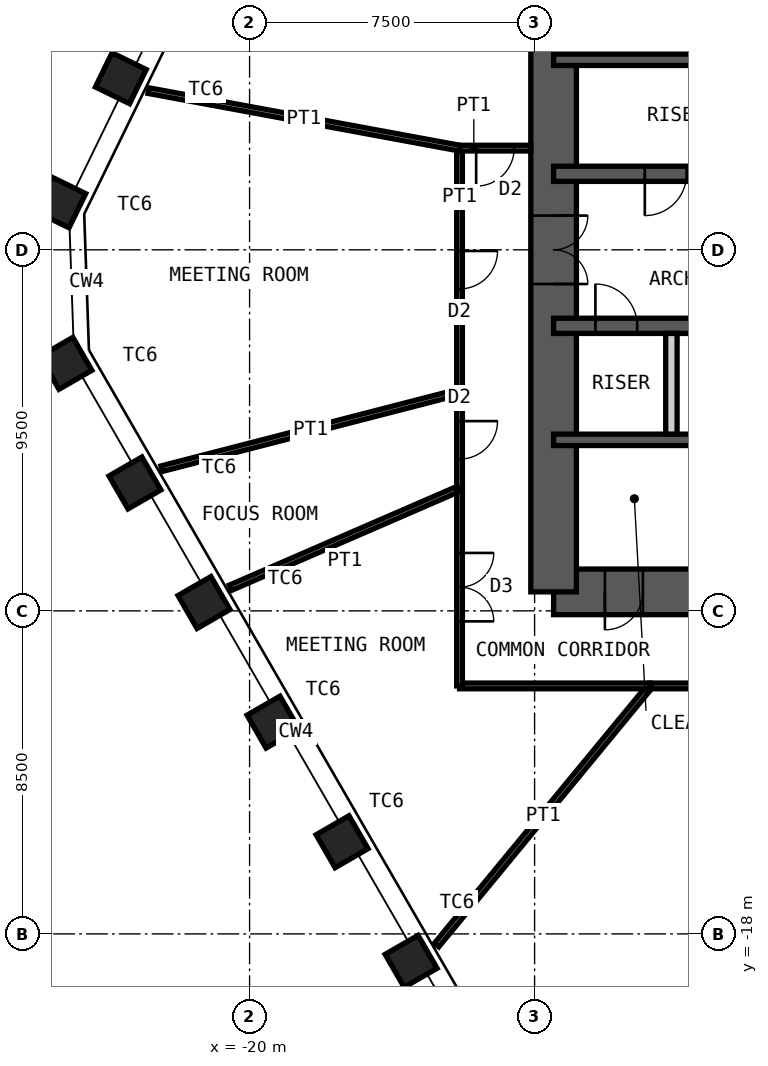
"""IFC4 building model, lengths in metres.
Left out: names, types, materials, properties, quantities, classifications, styles, units other than length and angle.
Written with IfcOpenShell. Run it as: python <this file> out.ifc"""

import sys

from ifc_helpers import new_model, si_unit, direction, frame, frame_2d, origin, origin_2d, place, context, subcontext, project, spatial, rectangle, hollow_rectangle, extrude, element, fill, save


model = new_model("IFC4")
c1 = context("Model", 3, precision=1e-05, world=origin(), true_north=direction((0.0, 1.0)))
c2 = subcontext(c1, "Body", "Model", "MODEL_VIEW")
j1 = project(units=[si_unit("LENGTHUNIT", "METRE"), si_unit("PLANEANGLEUNIT", "RADIAN")], contexts=[c1])
p1 = place(None, origin())
s1 = spatial("IfcSite", under=j1, at=p1, CompositionType="ELEMENT")
p2 = place(p1, origin())
s2 = spatial("IfcBuilding", under=s1, at=p2, CompositionType="ELEMENT")
p3 = place(p2, frame((0.0, 0.0, 247.6)))
s3 = spatial("IfcBuildingStorey", under=s2, at=p3, CompositionType="ELEMENT", Elevation=247.6)
for number, where, z_axis, x_axis in (
    (1, (-15.749, -18.721, 0.0), (0.0, 0.0, 1.0), (0.5, -0.866, 0.0)),
    (2, (-17.566, -15.574, 0.0), (0.0, 0.0, 1.0), (0.5, -0.866, 0.0)),
    (3, (-19.383, -12.428, 0.0), (0.0, 0.0, 1.0), (0.5, -0.866, 0.0)),
    (4, (-21.2, -9.281, 0.0), (0.0, 0.0, 1.0), (0.5, -0.866, 0.0)),
    (5, (-23.016, -6.134, 0.0), (0.0, 0.0, 1.0), (0.5, -0.866, 0.0)),
    (6, (-24.833, -2.988, 0.0), (0.0, 0.0, 1.0), (0.5, -0.866, 0.0)),
    (7, (-24.981, 1.248, 0.0), (0.0, 0.0, 1.0), (-0.438, -0.899, 0.0)),
    (8, (-23.388, 4.514, 0.0), (0.0, 0.0, 1.0), (-0.438, -0.899, 0.0)),
):
    element("IfcColumn", number, at=place(p3, frame(where, z_axis=z_axis, x_axis=x_axis)), inside=s3, PredefinedType="COLUMN", context=c2, shape_type="SweptSolid", body=[
        extrude(hollow_rectangle(XDim=1.0, YDim=1.0, WallThickness=0.06, at=origin_2d()), origin(), (0.0, 0.0, 1.0), 4.2),
    ])
p4 = place(p3, frame((-12.0, -9.0, 0.0), z_axis=(0.0, 0.0, 1.0), x_axis=(1.0, 0.0, 0.0)))
e9 = element("IfcWall", 9, at=p4, inside=s3, PredefinedType="SHEAR", context=c2, shape_type="SweptSolid", body=[
    extrude(rectangle(XDim=24.0, YDim=1.2, at=frame_2d((12.0, 0.0))), origin(), (0.0, 0.0, 1.0), 4.2),
])
p5 = place(p4, frame((1.35, 0.0, 0.0)))
e10 = element("IfcOpeningElement", 10, at=p5, cuts=e9, PredefinedType="OPENING", context=c2, shape_type="SweptSolid", body=[
    extrude(rectangle(XDim=1.0, YDim=2.1, at=frame_2d((0.5, 1.05))), frame((0.0, 0.61, 0.0), z_axis=(0.0, -1.0, 0.0), x_axis=(1.0, 0.0, 0.0)), (0.0, 0.0, 1.0), 1.22),
])
p6 = place(p4, frame((5.325, 0.0, 0.0)))
e11 = element("IfcOpeningElement", 11, at=p6, cuts=e9, PredefinedType="OPENING", context=c2, shape_type="SweptSolid", body=[
    extrude(rectangle(XDim=1.15, YDim=2.1, at=frame_2d((0.575, 1.05))), frame((0.0, 0.61, 0.0), z_axis=(0.0, -1.0, 0.0), x_axis=(1.0, 0.0, 0.0)), (0.0, 0.0, 1.0), 1.22),
])
p7 = place(p4, frame((12.6, 0.0, 0.0)))
e12 = element("IfcOpeningElement", 12, at=p7, cuts=e9, PredefinedType="OPENING", context=c2, shape_type="SweptSolid", body=[
    extrude(rectangle(XDim=1.0, YDim=2.1, at=frame_2d((0.5, 1.05))), frame((0.0, 0.61, 0.0), z_axis=(0.0, -1.0, 0.0), x_axis=(1.0, 0.0, 0.0)), (0.0, 0.0, 1.0), 1.22),
])
p8 = place(p3, frame((-12.0, -9.0, 0.0), z_axis=(0.0, 0.0, 1.0), x_axis=(0.0, 1.0, 0.0)))
e13 = element("IfcWall", 13, at=p8, inside=s3, PredefinedType="SHEAR", context=c2, shape_type="SweptSolid", body=[
    extrude(rectangle(XDim=18.0, YDim=1.2, at=frame_2d((9.0, 0.0))), origin(), (0.0, 0.0, 1.0), 4.2),
])
p9 = place(p8, frame((8.1, 0.0, 0.0)))
e14 = element("IfcOpeningElement", 14, at=p9, cuts=e13, PredefinedType="OPENING", context=c2, shape_type="SweptSolid", body=[
    extrude(rectangle(XDim=1.8, YDim=2.1, at=frame_2d((0.9, 1.05))), frame((0.0, 0.61, 0.0), z_axis=(0.0, -1.0, 0.0), x_axis=(1.0, 0.0, 0.0)), (0.0, 0.0, 1.0), 1.22),
])
p10 = place(p3, frame((-12.0, 5.0, 0.0), z_axis=(0.0, 0.0, 1.0), x_axis=(1.0, 0.0, 0.0)))
e15 = element("IfcWall", 15, at=p10, inside=s3, PredefinedType="SHEAR", context=c2, shape_type="SweptSolid", body=[
    extrude(rectangle(XDim=24.0, YDim=0.3, at=frame_2d((12.0, 0.0))), origin(), (0.0, 0.0, 1.0), 4.2),
])
p11 = place(p3, frame((-12.0, 2.0, 0.0), z_axis=(0.0, 0.0, 1.0), x_axis=(1.0, 0.0, 0.0)))
e16 = element("IfcWall", 16, at=p11, inside=s3, PredefinedType="SHEAR", context=c2, shape_type="SweptSolid", body=[
    extrude(rectangle(XDim=24.0, YDim=0.4, at=frame_2d((12.0, 0.0))), origin(), (0.0, 0.0, 1.0), 4.2),
])
p12 = place(p11, frame((2.4, 0.0, 0.0)))
e17 = element("IfcOpeningElement", 17, at=p12, cuts=e16, PredefinedType="OPENING", context=c2, shape_type="SweptSolid", body=[
    extrude(rectangle(XDim=1.1, YDim=2.1, at=frame_2d((0.55, 1.05))), frame((0.0, 0.21, 0.0), z_axis=(0.0, -1.0, 0.0), x_axis=(1.0, 0.0, 0.0)), (0.0, 0.0, 1.0), 0.42),
])
p13 = place(p11, frame((22.0, 0.0, 0.0)))
e18 = element("IfcOpeningElement", 18, at=p13, cuts=e16, PredefinedType="OPENING", context=c2, shape_type="SweptSolid", body=[
    extrude(rectangle(XDim=1.1, YDim=2.1, at=frame_2d((0.55, 1.05))), frame((0.0, 0.21, 0.0), z_axis=(0.0, -1.0, 0.0), x_axis=(1.0, 0.0, 0.0)), (0.0, 0.0, 1.0), 0.42),
])
p14 = place(p11, frame((10.15, 0.0, 0.0)))
e19 = element("IfcOpeningElement", 19, at=p14, cuts=e16, PredefinedType="OPENING", context=c2, shape_type="SweptSolid", body=[
    extrude(rectangle(XDim=1.0, YDim=2.1, at=frame_2d((0.5, 1.05))), frame((0.0, 0.21, 0.0), z_axis=(0.0, -1.0, 0.0), x_axis=(1.0, 0.0, 0.0)), (0.0, 0.0, 1.0), 0.42),
])
p15 = place(p11, frame((6.9, 0.0, 0.0)))
e20 = element("IfcOpeningElement", 20, at=p15, cuts=e16, PredefinedType="OPENING", context=c2, shape_type="SweptSolid", body=[
    extrude(rectangle(XDim=1.0, YDim=2.1, at=frame_2d((0.5, 1.05))), frame((0.0, 0.21, 0.0), z_axis=(0.0, -1.0, 0.0), x_axis=(1.0, 0.0, 0.0)), (0.0, 0.0, 1.0), 0.42),
])
p16 = place(p11, frame((13.35, 0.0, 0.0)))
e21 = element("IfcOpeningElement", 21, at=p16, cuts=e16, PredefinedType="OPENING", context=c2, shape_type="SweptSolid", body=[
    extrude(rectangle(XDim=1.1, YDim=2.4, at=frame_2d((0.55, 1.2))), frame((0.0, 0.21, 0.0), z_axis=(0.0, -1.0, 0.0), x_axis=(1.0, 0.0, 0.0)), (0.0, 0.0, 1.0), 0.42),
])
p17 = place(p11, frame((16.15, 0.0, 0.0)))
e22 = element("IfcOpeningElement", 22, at=p17, cuts=e16, PredefinedType="OPENING", context=c2, shape_type="SweptSolid", body=[
    extrude(rectangle(XDim=1.1, YDim=2.4, at=frame_2d((0.55, 1.2))), frame((0.0, 0.21, 0.0), z_axis=(0.0, -1.0, 0.0), x_axis=(1.0, 0.0, 0.0)), (0.0, 0.0, 1.0), 0.42),
])
p18 = place(p11, frame((18.95, 0.0, 0.0)))
e23 = element("IfcOpeningElement", 23, at=p18, cuts=e16, PredefinedType="OPENING", context=c2, shape_type="SweptSolid", body=[
    extrude(rectangle(XDim=1.1, YDim=2.4, at=frame_2d((0.55, 1.2))), frame((0.0, 0.21, 0.0), z_axis=(0.0, -1.0, 0.0), x_axis=(1.0, 0.0, 0.0)), (0.0, 0.0, 1.0), 0.42),
])
p19 = place(p3, frame((-12.0, -2.0, 0.0), z_axis=(0.0, 0.0, 1.0), x_axis=(1.0, 0.0, 0.0)))
e24 = element("IfcWall", 24, at=p19, inside=s3, PredefinedType="SHEAR", context=c2, shape_type="SweptSolid", body=[
    extrude(rectangle(XDim=24.0, YDim=0.4, at=frame_2d((12.0, 0.0))), origin(), (0.0, 0.0, 1.0), 4.2),
])
p20 = place(p19, frame((1.1, 0.0, 0.0)))
e25 = element("IfcOpeningElement", 25, at=p20, cuts=e24, PredefinedType="OPENING", context=c2, shape_type="SweptSolid", body=[
    extrude(rectangle(XDim=1.1, YDim=2.1, at=frame_2d((0.55, 1.05))), frame((0.0, 0.21, 0.0), z_axis=(0.0, -1.0, 0.0), x_axis=(1.0, 0.0, 0.0)), (0.0, 0.0, 1.0), 0.42),
])
p21 = place(p19, frame((13.55, 0.0, 0.0)))
e26 = element("IfcOpeningElement", 26, at=p21, cuts=e24, PredefinedType="OPENING", context=c2, shape_type="SweptSolid", body=[
    extrude(rectangle(XDim=1.1, YDim=2.1, at=frame_2d((0.55, 1.05))), frame((0.0, 0.21, 0.0), z_axis=(0.0, -1.0, 0.0), x_axis=(1.0, 0.0, 0.0)), (0.0, 0.0, 1.0), 0.42),
])
p22 = place(p19, frame((20.7, 0.0, 0.0)))
e27 = element("IfcOpeningElement", 27, at=p22, cuts=e24, PredefinedType="OPENING", context=c2, shape_type="SweptSolid", body=[
    extrude(rectangle(XDim=1.1, YDim=2.1, at=frame_2d((0.55, 1.05))), frame((0.0, 0.21, 0.0), z_axis=(0.0, -1.0, 0.0), x_axis=(1.0, 0.0, 0.0)), (0.0, 0.0, 1.0), 0.42),
])
p23 = place(p19, frame((4.0, 0.0, 0.0)))
e28 = element("IfcOpeningElement", 28, at=p23, cuts=e24, PredefinedType="OPENING", context=c2, shape_type="SweptSolid", body=[
    extrude(rectangle(XDim=1.0, YDim=2.1, at=frame_2d((0.5, 1.05))), frame((0.0, 0.21, 0.0), z_axis=(0.0, -1.0, 0.0), x_axis=(1.0, 0.0, 0.0)), (0.0, 0.0, 1.0), 0.42),
])
p24 = place(p19, frame((6.8, 0.0, 0.0)))
e29 = element("IfcOpeningElement", 29, at=p24, cuts=e24, PredefinedType="OPENING", context=c2, shape_type="SweptSolid", body=[
    extrude(rectangle(XDim=1.0, YDim=2.1, at=frame_2d((0.5, 1.05))), frame((0.0, 0.21, 0.0), z_axis=(0.0, -1.0, 0.0), x_axis=(1.0, 0.0, 0.0)), (0.0, 0.0, 1.0), 0.42),
])
p25 = place(p3, frame((-12.0, -5.0, 0.0), z_axis=(0.0, 0.0, 1.0), x_axis=(1.0, 0.0, 0.0)))
e30 = element("IfcWall", 30, at=p25, inside=s3, PredefinedType="SHEAR", context=c2, shape_type="SweptSolid", body=[
    extrude(rectangle(XDim=24.0, YDim=0.3, at=frame_2d((12.0, 0.0))), origin(), (0.0, 0.0, 1.0), 4.2),
])
p26 = place(p3, frame((-8.9, -4.85, 0.0), z_axis=(0.0, 0.0, 1.0), x_axis=(0.0, 1.0, 0.0)))
e31 = element("IfcWall", 31, at=p26, inside=s3, PredefinedType="PARTITIONING", context=c2, shape_type="SweptSolid", body=[
    extrude(rectangle(XDim=2.65, YDim=0.3, at=frame_2d((1.325, 0.0))), origin(), (0.0, 0.0, 1.0), 3.98),
])
p27 = place(p3, frame((4.07, -11.475, 0.0), z_axis=(0.0, 0.0, 1.0), x_axis=(-1.0, 0.0, 0.0)))
e32 = element("IfcWall", 32, at=p27, inside=s3, PredefinedType="PARTITIONING", context=c2, shape_type="SweptSolid", body=[
    extrude(rectangle(XDim=13.528, YDim=0.15, at=frame_2d((6.764, 0.0))), origin(), (0.0, 0.0, 1.0), 4.03),
])
p28 = place(p27, frame((5.864, 0.0, 0.0)))
e33 = element("IfcOpeningElement", 33, at=p28, cuts=e32, PredefinedType="OPENING", context=c2, shape_type="SweptSolid", body=[
    extrude(rectangle(XDim=1.8, YDim=2.4, at=frame_2d((0.9, 1.2))), frame((0.0, 0.085, 0.0), z_axis=(0.0, -1.0, 0.0), x_axis=(1.0, 0.0, 0.0)), (0.0, 0.0, 1.0), 0.17),
])
p29 = place(p3, frame((-15.08, -18.294, 0.0), z_axis=(0.0, 0.0, 1.0), x_axis=(0.636052894953, 0.771645459277, 0.0)))
e34 = element("IfcWall", 34, at=p29, inside=s3, PredefinedType="PARTITIONING", context=c2, shape_type="SweptSolid", body=[
    extrude(rectangle(XDim=8.837, YDim=0.15, at=frame_2d((4.418, 0.0))), origin(), (0.0, 0.0, 1.0), 2.93),
])
p30 = place(p3, frame((-9.459, -11.475, 0.0), z_axis=(0.0, 0.0, 1.0), x_axis=(-1.0, 0.0, 0.0)))
e35 = element("IfcWall", 35, at=p30, inside=s3, PredefinedType="PARTITIONING", context=c2, shape_type="SweptSolid", body=[
    extrude(rectangle(XDim=5.016, YDim=0.15, at=frame_2d((2.508, 0.0))), origin(), (0.0, 0.0, 1.0), 4.03),
])
p31 = place(p3, frame((-14.475, -11.475, 0.0), z_axis=(0.0, 0.0, 1.0), x_axis=(0.0, 1.0, 0.0)))
e36 = element("IfcWall", 36, at=p31, inside=s3, PredefinedType="PARTITIONING", context=c2, shape_type="SweptSolid", body=[
    extrude(rectangle(XDim=5.198, YDim=0.15, at=frame_2d((2.599, 0.0))), origin(), (0.0, 0.0, 1.0), 4.03),
])
p32 = place(p31, frame((1.699, 0.0, 0.0)))
e37 = element("IfcOpeningElement", 37, at=p32, cuts=e36, PredefinedType="OPENING", context=c2, shape_type="SweptSolid", body=[
    extrude(rectangle(XDim=1.8, YDim=2.4, at=frame_2d((0.9, 1.2))), frame((0.0, 0.085, 0.0), z_axis=(0.0, -1.0, 0.0), x_axis=(1.0, 0.0, 0.0)), (0.0, 0.0, 1.0), 0.17),
])
p33 = place(p3, frame((-20.502, -8.891, 0.0), z_axis=(0.0, 0.0, 1.0), x_axis=(0.917431289744, 0.397894242982, 0.0)))
e38 = element("IfcWall", 38, at=p33, inside=s3, PredefinedType="PARTITIONING", context=c2, shape_type="SweptSolid", body=[
    extrude(rectangle(XDim=6.569, YDim=0.15, at=frame_2d((3.285, 0.0))), origin(), (0.0, 0.0, 1.0), 2.93),
])
p34 = place(p3, frame((-14.475, -6.278, 0.0), z_axis=(0.0, 0.0, 1.0), x_axis=(0.0, 1.0, 0.0)))
e39 = element("IfcWall", 39, at=p34, inside=s3, PredefinedType="PARTITIONING", context=c2, shape_type="SweptSolid", body=[
    extrude(rectangle(XDim=2.542, YDim=0.15, at=frame_2d((1.271, 0.0))), origin(), (0.0, 0.0, 1.0), 4.03),
])
p35 = place(p34, frame((0.771, 0.0, 0.0)))
e40 = element("IfcOpeningElement", 40, at=p35, cuts=e39, PredefinedType="OPENING", context=c2, shape_type="SweptSolid", body=[
    extrude(rectangle(XDim=1.0, YDim=2.4, at=frame_2d((0.5, 1.2))), frame((0.0, 0.085, 0.0), z_axis=(0.0, -1.0, 0.0), x_axis=(1.0, 0.0, 0.0)), (0.0, 0.0, 1.0), 0.17),
])
p36 = place(p3, frame((-22.313, -5.759, 0.0), z_axis=(0.0, 0.0, 1.0), x_axis=(0.968265788926, 0.249922712042, 0.0)))
e41 = element("IfcWall", 41, at=p36, inside=s3, PredefinedType="PARTITIONING", context=c2, shape_type="SweptSolid", body=[
    extrude(rectangle(XDim=8.095, YDim=0.15, at=frame_2d((4.048, 0.0))), origin(), (0.0, 0.0, 1.0), 2.93),
])
p37 = place(p3, frame((-14.475, -3.736, 0.0), z_axis=(0.0, 0.0, 1.0), x_axis=(0.0, 1.0, 0.0)))
e42 = element("IfcWall", 42, at=p37, inside=s3, PredefinedType="PARTITIONING", context=c2, shape_type="SweptSolid", body=[
    extrude(rectangle(XDim=6.412, YDim=0.15, at=frame_2d((3.206, 0.0))), origin(), (0.0, 0.0, 1.0), 4.03),
])
p38 = place(p37, frame((2.706, 0.0, 0.0)))
e43 = element("IfcOpeningElement", 43, at=p38, cuts=e42, PredefinedType="OPENING", context=c2, shape_type="SweptSolid", body=[
    extrude(rectangle(XDim=1.0, YDim=2.4, at=frame_2d((0.5, 1.2))), frame((0.0, 0.085, 0.0), z_axis=(0.0, -1.0, 0.0), x_axis=(1.0, 0.0, 0.0)), (0.0, 0.0, 1.0), 0.17),
])
p39 = place(p3, frame((-22.661, 4.189, 0.0), z_axis=(0.0, 0.0, 1.0), x_axis=(0.983345347199, -0.181746879316, 0.0)))
e44 = element("IfcWall", 44, at=p39, inside=s3, PredefinedType="PARTITIONING", context=c2, shape_type="SweptSolid", body=[
    extrude(rectangle(XDim=8.324, YDim=0.15, at=frame_2d((4.162, 0.0))), origin(), (0.0, 0.0, 1.0), 2.93),
])
p40 = place(p3, frame((-14.475, 2.676, 0.0), z_axis=(0.0, 0.0, 1.0), x_axis=(1.0, 0.0, 0.0)))
e45 = element("IfcWall", 45, at=p40, inside=s3, PredefinedType="PARTITIONING", context=c2, shape_type="SweptSolid", body=[
    extrude(rectangle(XDim=1.875, YDim=0.15, at=frame_2d((0.938, 0.0))), origin(), (0.0, 0.0, 1.0), 2.93),
])
p41 = place(p40, frame((0.438, 0.0, 0.0)))
e46 = element("IfcOpeningElement", 46, at=p41, cuts=e45, PredefinedType="OPENING", context=c2, shape_type="SweptSolid", body=[
    extrude(rectangle(XDim=1.0, YDim=2.4, at=frame_2d((0.5, 1.2))), frame((0.0, 0.085, 0.0), z_axis=(0.0, -1.0, 0.0), x_axis=(1.0, 0.0, 0.0)), (0.0, 0.0, 1.0), 0.17),
])
p42 = place(p5, origin())
e47 = element("IfcDoor", 47, at=p42, inside=s3, OperationType="SINGLE_SWING_LEFT", PredefinedType="DOOR", context=c2, shape_type="SweptSolid", body=[
    extrude(rectangle(XDim=1.0, YDim=2.1, at=frame_2d((0.5, 1.05))), frame((0.0, 0.025, 0.0), z_axis=(0.0, -1.0, 0.0), x_axis=(1.0, 0.0, 0.0)), (0.0, 0.0, 1.0), 0.05),
])
fill(e10, e47)
p43 = place(p12, origin())
e48 = element("IfcDoor", 48, at=p43, inside=s3, OperationType="SINGLE_SWING_LEFT", PredefinedType="DOOR", context=c2, shape_type="SweptSolid", body=[
    extrude(rectangle(XDim=1.1, YDim=2.1, at=frame_2d((0.55, 1.05))), frame((0.0, 0.025, 0.0), z_axis=(0.0, -1.0, 0.0), x_axis=(1.0, 0.0, 0.0)), (0.0, 0.0, 1.0), 0.05),
])
fill(e17, e48)
p44 = place(p20, origin())
e49 = element("IfcDoor", 49, at=p44, inside=s3, OperationType="SINGLE_SWING_RIGHT", PredefinedType="DOOR", context=c2, shape_type="SweptSolid", body=[
    extrude(rectangle(XDim=1.1, YDim=2.1, at=frame_2d((0.55, 1.05))), frame((0.0, 0.025, 0.0), z_axis=(0.0, -1.0, 0.0), x_axis=(1.0, 0.0, 0.0)), (0.0, 0.0, 1.0), 0.05),
])
fill(e25, e49)
p45 = place(p9, origin())
e50 = element("IfcDoor", 50, at=p45, inside=s3, OperationType="DOUBLE_DOOR_DOUBLE_SWING", PredefinedType="DOOR", context=c2, shape_type="SweptSolid", body=[
    extrude(rectangle(XDim=1.8, YDim=2.1, at=frame_2d((0.9, 1.05))), frame((0.0, 0.025, 0.0), z_axis=(0.0, -1.0, 0.0), x_axis=(1.0, 0.0, 0.0)), (0.0, 0.0, 1.0), 0.05),
])
fill(e14, e50)
p46 = place(p32, origin())
e51 = element("IfcDoor", 51, at=p46, inside=s3, OperationType="DOUBLE_DOOR_DOUBLE_SWING", PredefinedType="DOOR", context=c2, shape_type="SweptSolid", body=[
    extrude(rectangle(XDim=1.8, YDim=2.4, at=frame_2d((0.9, 1.2))), frame((0.0, 0.025, 0.0), z_axis=(0.0, -1.0, 0.0), x_axis=(1.0, 0.0, 0.0)), (0.0, 0.0, 1.0), 0.05),
])
fill(e37, e51)
p47 = place(p35, origin())
e52 = element("IfcDoor", 52, at=p47, inside=s3, OperationType="SINGLE_SWING_RIGHT", PredefinedType="DOOR", context=c2, shape_type="SweptSolid", body=[
    extrude(rectangle(XDim=1.0, YDim=2.4, at=frame_2d((0.5, 1.2))), frame((0.0, 0.025, 0.0), z_axis=(0.0, -1.0, 0.0), x_axis=(1.0, 0.0, 0.0)), (0.0, 0.0, 1.0), 0.05),
])
fill(e40, e52)
p48 = place(p38, origin())
e53 = element("IfcDoor", 53, at=p48, inside=s3, OperationType="SINGLE_SWING_RIGHT", PredefinedType="DOOR", context=c2, shape_type="SweptSolid", body=[
    extrude(rectangle(XDim=1.0, YDim=2.4, at=frame_2d((0.5, 1.2))), frame((0.0, 0.025, 0.0), z_axis=(0.0, -1.0, 0.0), x_axis=(1.0, 0.0, 0.0)), (0.0, 0.0, 1.0), 0.05),
])
fill(e43, e53)
p49 = place(p41, origin())
e54 = element("IfcDoor", 54, at=p49, inside=s3, OperationType="SINGLE_SWING_LEFT", PredefinedType="DOOR", context=c2, shape_type="SweptSolid", body=[
    extrude(rectangle(XDim=1.0, YDim=2.4, at=frame_2d((0.5, 1.2))), frame((0.0, 0.025, 0.0), z_axis=(0.0, -1.0, 0.0), x_axis=(1.0, 0.0, 0.0)), (0.0, 0.0, 1.0), 0.05),
])
fill(e46, e54)
save(model, sys.argv[1])
